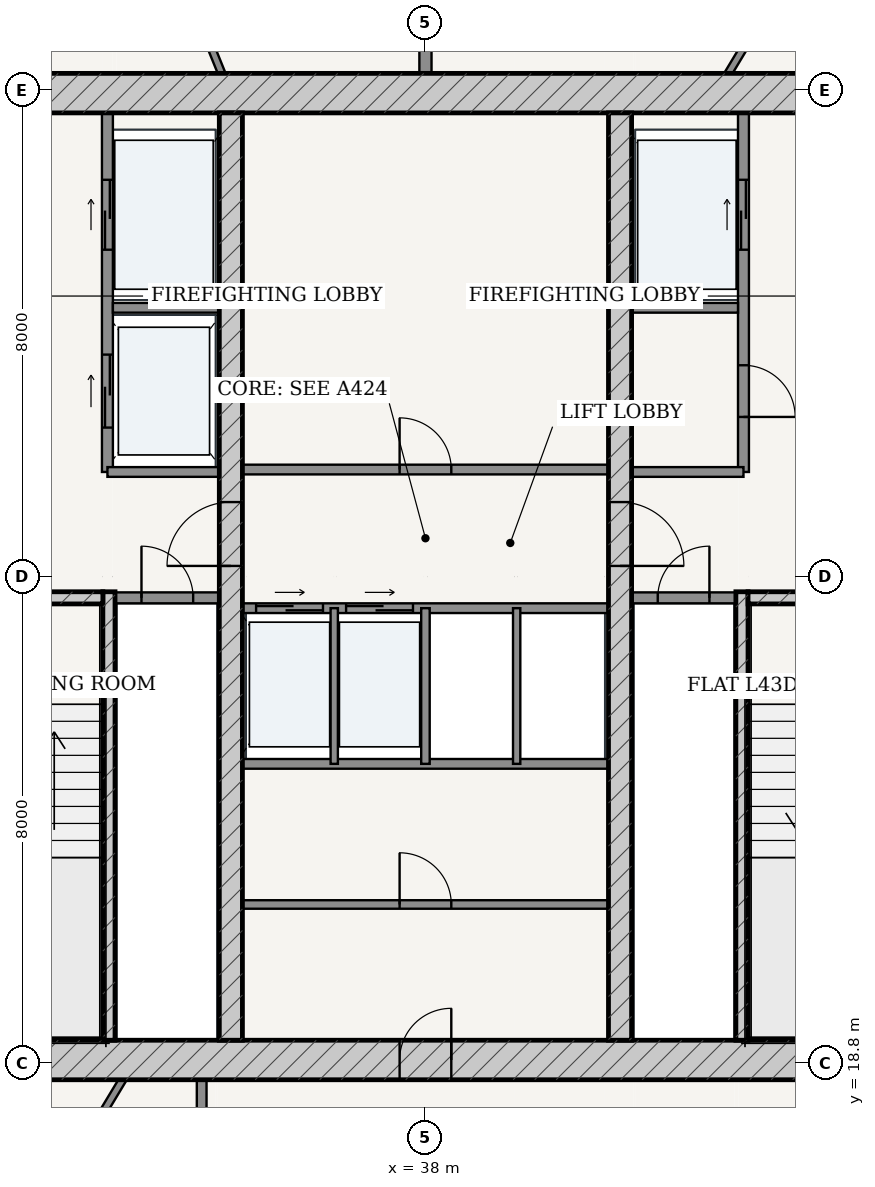
"""IFC4 building model, lengths in metres.
Left out: names, types, materials, properties, quantities, classifications, styles, units other than length and angle.
Written with IfcOpenShell. Run it as: python <this file> out.ifc"""

import sys

from ifc_helpers import new_model, si_unit, direction, frame, frame_2d, origin, place, context, subcontext, project, spatial, rectangle, extrude, source, transform, mapped, element, fill, save


model = new_model("IFC4")
c1 = context("Model", 3, precision=1e-05, world=origin(), true_north=direction((-0.2419218956, 0.970295726276)))
c2 = subcontext(c1, "Body", "Model", "MODEL_VIEW")
j1 = project(units=[si_unit("LENGTHUNIT", "METRE"), si_unit("PLANEANGLEUNIT", "RADIAN")], contexts=[c1])
p1 = place(None, origin())
s1 = spatial("IfcSite", under=j1, at=p1, CompositionType="ELEMENT")
p2 = place(p1, origin())
s2 = spatial("IfcBuilding", under=s1, at=p2, CompositionType="ELEMENT")
p3 = place(p2, frame((0.0, 0.0, 164.2)))
s3 = spatial("IfcBuildingStorey", under=s2, at=p3, CompositionType="ELEMENT", Elevation=164.2)
p4 = place(p3, frame((28.725, 18.85, 0.0), z_axis=(0.0, 0.0, 1.0), x_axis=(1.0, 0.0, 0.0)))
e1 = element("IfcWall", 1, at=p4, inside=s3, PredefinedType="SHEAR", context=c2, shape_type="SweptSolid", body=[
    extrude(rectangle(XDim=18.55, YDim=0.65, at=frame_2d((9.275, 0.0))), origin(), (0.0, 0.0, 1.0), 3.33),
])
p5 = place(p4, frame((8.85, 0.0, 0.0)))
e2 = element("IfcOpeningElement", 2, at=p5, cuts=e1, PredefinedType="OPENING", context=c2, shape_type="SweptSolid", body=[
    extrude(rectangle(XDim=0.85, YDim=2.1, at=frame_2d((0.425, 1.05))), frame((0.0, 0.335, 0.0), z_axis=(0.0, -1.0, 0.0), x_axis=(1.0, 0.0, 0.0)), (0.0, 0.0, 1.0), 0.67),
])
p6 = place(p3, frame((28.725, 34.75, 0.0), z_axis=(0.0, 0.0, 1.0), x_axis=(1.0, 0.0, 0.0)))
e3 = element("IfcWall", 3, at=p6, inside=s3, PredefinedType="SHEAR", context=c2, shape_type="SweptSolid", body=[
    extrude(rectangle(XDim=18.55, YDim=0.65, at=frame_2d((9.275, 0.0))), origin(), (0.0, 0.0, 1.0), 3.33),
])
p7 = place(p3, frame((32.795, 19.175, 0.0), z_axis=(0.0, 0.0, 1.0), x_axis=(0.0, 1.0, 0.0)))
e4 = element("IfcWall", 4, at=p7, inside=s3, PredefinedType="SOLIDWALL", context=c2, shape_type="SweptSolid", body=[
    extrude(rectangle(XDim=7.375, YDim=0.2, at=frame_2d((3.688, 0.0))), origin(), (0.0, 0.0, 1.0), 3.33),
])
p8 = place(p3, frame((29.375, 26.45, 0.0), z_axis=(0.0, 0.0, 1.0), x_axis=(1.0, 0.0, 0.0)))
e5 = element("IfcWall", 5, at=p8, inside=s3, PredefinedType="SOLIDWALL", context=c2, shape_type="SweptSolid", body=[
    extrude(rectangle(XDim=3.32, YDim=0.2, at=frame_2d((1.66, 0.0))), origin(), (0.0, 0.0, 1.0), 3.33),
])
p9 = place(p8, frame((1.185, 0.0, 0.0)))
e6 = element("IfcOpeningElement", 6, at=p9, cuts=e5, PredefinedType="OPENING", context=c2, shape_type="SweptSolid", body=[
    extrude(rectangle(XDim=0.95, YDim=2.15, at=frame_2d((0.475, 1.075))), frame((0.0, 0.11, 0.0), z_axis=(0.0, -1.0, 0.0), x_axis=(1.0, 0.0, 0.0)), (0.0, 0.0, 1.0), 0.22),
])
p10 = place(p3, frame((43.205, 19.175, 0.0), z_axis=(0.0, 0.0, 1.0), x_axis=(0.0, 1.0, 0.0)))
e7 = element("IfcWall", 7, at=p10, inside=s3, PredefinedType="SOLIDWALL", context=c2, shape_type="SweptSolid", body=[
    extrude(rectangle(XDim=7.375, YDim=0.2, at=frame_2d((3.688, 0.0))), origin(), (0.0, 0.0, 1.0), 3.33),
])
p11 = place(p3, frame((43.305, 26.45, 0.0), z_axis=(0.0, 0.0, 1.0), x_axis=(1.0, 0.0, 0.0)))
e8 = element("IfcWall", 8, at=p11, inside=s3, PredefinedType="SOLIDWALL", context=c2, shape_type="SweptSolid", body=[
    extrude(rectangle(XDim=3.32, YDim=0.2, at=frame_2d((1.66, 0.0))), origin(), (0.0, 0.0, 1.0), 3.33),
])
p12 = place(p11, frame((1.185, 0.0, 0.0)))
e9 = element("IfcOpeningElement", 9, at=p12, cuts=e8, PredefinedType="OPENING", context=c2, shape_type="SweptSolid", body=[
    extrude(rectangle(XDim=0.95, YDim=2.15, at=frame_2d((0.475, 1.075))), frame((0.0, 0.11, 0.0), z_axis=(0.0, -1.0, 0.0), x_axis=(1.0, 0.0, 0.0)), (0.0, 0.0, 1.0), 0.22),
])
p13 = place(p3, frame((34.8, 19.175, 0.0), z_axis=(0.0, 0.0, 1.0), x_axis=(0.0, 1.0, 0.0)))
e10 = element("IfcWall", 10, at=p13, inside=s3, PredefinedType="SHEAR", context=c2, shape_type="SweptSolid", body=[
    extrude(rectangle(XDim=15.25, YDim=0.38, at=frame_2d((7.625, 0.0))), origin(), (0.0, 0.0, 1.0), 3.33),
])
p14 = place(p13, frame((7.8, 0.0, 0.0)))
e11 = element("IfcOpeningElement", 11, at=p14, cuts=e10, PredefinedType="OPENING", context=c2, shape_type="SweptSolid", body=[
    extrude(rectangle(XDim=1.05, YDim=2.15, at=frame_2d((0.525, 1.075))), frame((0.0, 0.2, 0.0), z_axis=(0.0, -1.0, 0.0), x_axis=(1.0, 0.0, 0.0)), (0.0, 0.0, 1.0), 0.4),
])
p15 = place(p3, frame((41.2, 19.175, 0.0), z_axis=(0.0, 0.0, 1.0), x_axis=(0.0, 1.0, 0.0)))
e12 = element("IfcWall", 12, at=p15, inside=s3, PredefinedType="SHEAR", context=c2, shape_type="SweptSolid", body=[
    extrude(rectangle(XDim=15.25, YDim=0.38, at=frame_2d((7.625, 0.0))), origin(), (0.0, 0.0, 1.0), 3.33),
])
p16 = place(p15, frame((7.8, 0.0, 0.0)))
e13 = element("IfcOpeningElement", 13, at=p16, cuts=e12, PredefinedType="OPENING", context=c2, shape_type="SweptSolid", body=[
    extrude(rectangle(XDim=1.05, YDim=2.15, at=frame_2d((0.525, 1.075))), frame((0.0, 0.2, 0.0), z_axis=(0.0, -1.0, 0.0), x_axis=(1.0, 0.0, 0.0)), (0.0, 0.0, 1.0), 0.4),
])
p17 = place(p3, frame((32.9, 26.45, 0.0), z_axis=(0.0, 0.0, 1.0), x_axis=(1.0, 0.0, 0.0)))
e14 = element("IfcWall", 14, at=p17, inside=s3, PredefinedType="PARTITIONING", context=c2, shape_type="SweptSolid", body=[
    extrude(rectangle(XDim=1.71, YDim=0.18, at=frame_2d((0.855, 0.0))), origin(), (0.0, 0.0, 1.0), 3.33),
])
p18 = place(p17, frame((0.43, 0.0, 0.0)))
e15 = element("IfcOpeningElement", 15, at=p18, cuts=e14, PredefinedType="OPENING", context=c2, shape_type="SweptSolid", body=[
    extrude(rectangle(XDim=0.85, YDim=2.1, at=frame_2d((0.425, 1.05))), frame((0.0, 0.1, 0.0), z_axis=(0.0, -1.0, 0.0), x_axis=(1.0, 0.0, 0.0)), (0.0, 0.0, 1.0), 0.2),
])
p19 = place(p3, frame((41.39, 26.45, 0.0), z_axis=(0.0, 0.0, 1.0), x_axis=(1.0, 0.0, 0.0)))
e16 = element("IfcWall", 16, at=p19, inside=s3, PredefinedType="PARTITIONING", context=c2, shape_type="SweptSolid", body=[
    extrude(rectangle(XDim=1.71, YDim=0.18, at=frame_2d((0.855, 0.0))), origin(), (0.0, 0.0, 1.0), 3.33),
])
p20 = place(p19, frame((0.43, 0.0, 0.0)))
e17 = element("IfcOpeningElement", 17, at=p20, cuts=e16, PredefinedType="OPENING", context=c2, shape_type="SweptSolid", body=[
    extrude(rectangle(XDim=0.85, YDim=2.1, at=frame_2d((0.425, 1.05))), frame((0.0, 0.1, 0.0), z_axis=(0.0, -1.0, 0.0), x_axis=(1.0, 0.0, 0.0)), (0.0, 0.0, 1.0), 0.2),
])
p21 = place(p3, frame((32.77, 28.52, 0.0), z_axis=(0.0, 0.0, 1.0), x_axis=(0.0, 1.0, 0.0)))
e18 = element("IfcWall", 18, at=p21, inside=s3, PredefinedType="PARTITIONING", context=c2, shape_type="SweptSolid", body=[
    extrude(rectangle(XDim=5.905, YDim=0.18, at=frame_2d((2.953, 0.0))), origin(), (0.0, 0.0, 1.0), 3.33),
])
p22 = place(p21, frame((3.655, 0.0, 0.0)))
e19 = element("IfcOpeningElement", 19, at=p22, cuts=e18, PredefinedType="OPENING", context=c2, shape_type="SweptSolid", body=[
    extrude(rectangle(XDim=1.15, YDim=2.2, at=frame_2d((0.575, 1.1))), frame((0.0, 0.1, 0.0), z_axis=(0.0, -1.0, 0.0), x_axis=(1.0, 0.0, 0.0)), (0.0, 0.0, 1.0), 0.2),
])
p23 = place(p21, frame((0.73, 0.0, 0.0)))
e20 = element("IfcOpeningElement", 20, at=p23, cuts=e18, PredefinedType="OPENING", context=c2, shape_type="SweptSolid", body=[
    extrude(rectangle(XDim=1.2, YDim=2.25, at=frame_2d((0.6, 1.125))), frame((0.0, 0.1, 0.0), z_axis=(0.0, -1.0, 0.0), x_axis=(1.0, 0.0, 0.0)), (0.0, 0.0, 1.0), 0.2),
])
p24 = place(p3, frame((32.86, 31.22, 0.0), z_axis=(0.0, 0.0, 1.0), x_axis=(1.0, 0.0, 0.0)))
e21 = element("IfcWall", 21, at=p24, inside=s3, PredefinedType="PARTITIONING", context=c2, shape_type="SweptSolid", body=[
    extrude(rectangle(XDim=1.75, YDim=0.16, at=frame_2d((0.875, 0.0))), origin(), (0.0, 0.0, 1.0), 3.33),
])
p25 = place(p3, frame((32.77, 28.52, 0.0), z_axis=(0.0, 0.0, 1.0), x_axis=(1.0, 0.0, 0.0)))
e22 = element("IfcWall", 22, at=p25, inside=s3, PredefinedType="PARTITIONING", context=c2, shape_type="SweptSolid", body=[
    extrude(rectangle(XDim=1.84, YDim=0.16, at=frame_2d((0.92, 0.0))), origin(), (0.0, 0.0, 1.0), 3.33),
])
p26 = place(p3, frame((43.23, 28.52, 0.0), z_axis=(0.0, 0.0, 1.0), x_axis=(0.0, 1.0, 0.0)))
e23 = element("IfcWall", 23, at=p26, inside=s3, PredefinedType="PARTITIONING", context=c2, shape_type="SweptSolid", body=[
    extrude(rectangle(XDim=5.905, YDim=0.18, at=frame_2d((2.953, 0.0))), origin(), (0.0, 0.0, 1.0), 3.33),
])
p27 = place(p26, frame((0.905, 0.0, 0.0)))
e24 = element("IfcOpeningElement", 24, at=p27, cuts=e23, PredefinedType="OPENING", context=c2, shape_type="SweptSolid", body=[
    extrude(rectangle(XDim=0.85, YDim=2.1, at=frame_2d((0.425, 1.05))), frame((0.0, 0.1, 0.0), z_axis=(0.0, -1.0, 0.0), x_axis=(1.0, 0.0, 0.0)), (0.0, 0.0, 1.0), 0.2),
])
p28 = place(p26, frame((3.655, 0.0, 0.0)))
e25 = element("IfcOpeningElement", 25, at=p28, cuts=e23, PredefinedType="OPENING", context=c2, shape_type="SweptSolid", body=[
    extrude(rectangle(XDim=1.15, YDim=2.2, at=frame_2d((0.575, 1.1))), frame((0.0, 0.1, 0.0), z_axis=(0.0, -1.0, 0.0), x_axis=(1.0, 0.0, 0.0)), (0.0, 0.0, 1.0), 0.2),
])
p29 = place(p3, frame((41.39, 31.22, 0.0), z_axis=(0.0, 0.0, 1.0), x_axis=(1.0, 0.0, 0.0)))
e26 = element("IfcWall", 26, at=p29, inside=s3, PredefinedType="PARTITIONING", context=c2, shape_type="SweptSolid", body=[
    extrude(rectangle(XDim=1.75, YDim=0.16, at=frame_2d((0.875, 0.0))), origin(), (0.0, 0.0, 1.0), 3.33),
])
p30 = place(p3, frame((41.39, 28.52, 0.0), z_axis=(0.0, 0.0, 1.0), x_axis=(1.0, 0.0, 0.0)))
e27 = element("IfcWall", 27, at=p30, inside=s3, PredefinedType="PARTITIONING", context=c2, shape_type="SweptSolid", body=[
    extrude(rectangle(XDim=1.84, YDim=0.16, at=frame_2d((0.92, 0.0))), origin(), (0.0, 0.0, 1.0), 3.33),
])
p31 = place(p3, frame((34.99, 28.56, 0.0), z_axis=(0.0, 0.0, 1.0), x_axis=(1.0, 0.0, 0.0)))
e28 = element("IfcWall", 28, at=p31, inside=s3, PredefinedType="PARTITIONING", context=c2, shape_type="SweptSolid", body=[
    extrude(rectangle(XDim=6.02, YDim=0.16, at=frame_2d((3.01, 0.0))), origin(), (0.0, 0.0, 1.0), 3.33),
])
p32 = place(p31, frame((2.585, 0.0, 0.0)))
e29 = element("IfcOpeningElement", 29, at=p32, cuts=e28, PredefinedType="OPENING", context=c2, shape_type="SweptSolid", body=[
    extrude(rectangle(XDim=0.85, YDim=2.1, at=frame_2d((0.425, 1.05))), frame((0.0, 0.09, 0.0), z_axis=(0.0, -1.0, 0.0), x_axis=(1.0, 0.0, 0.0)), (0.0, 0.0, 1.0), 0.18),
])
p33 = place(p3, frame((34.99, 26.28, 0.0), z_axis=(0.0, 0.0, 1.0), x_axis=(1.0, 0.0, 0.0)))
e30 = element("IfcWall", 30, at=p33, inside=s3, PredefinedType="PARTITIONING", context=c2, shape_type="SweptSolid", body=[
    extrude(rectangle(XDim=6.02, YDim=0.16, at=frame_2d((3.01, 0.0))), origin(), (0.0, 0.0, 1.0), 3.33),
])
p34 = place(p33, frame((0.225, 0.0, 0.0)))
e31 = element("IfcOpeningElement", 31, at=p34, cuts=e30, PredefinedType="OPENING", context=c2, shape_type="SweptSolid", body=[
    extrude(rectangle(XDim=1.1, YDim=2.2, at=frame_2d((0.55, 1.1))), frame((0.0, 0.09, 0.0), z_axis=(0.0, -1.0, 0.0), x_axis=(1.0, 0.0, 0.0)), (0.0, 0.0, 1.0), 0.18),
])
p35 = place(p33, frame((1.705, 0.0, 0.0)))
e32 = element("IfcOpeningElement", 32, at=p35, cuts=e30, PredefinedType="OPENING", context=c2, shape_type="SweptSolid", body=[
    extrude(rectangle(XDim=1.1, YDim=2.2, at=frame_2d((0.55, 1.1))), frame((0.0, 0.09, 0.0), z_axis=(0.0, -1.0, 0.0), x_axis=(1.0, 0.0, 0.0)), (0.0, 0.0, 1.0), 0.18),
])
p36 = place(p3, frame((34.99, 23.72, 0.0), z_axis=(0.0, 0.0, 1.0), x_axis=(1.0, 0.0, 0.0)))
e33 = element("IfcWall", 33, at=p36, inside=s3, PredefinedType="PARTITIONING", context=c2, shape_type="SweptSolid", body=[
    extrude(rectangle(XDim=6.02, YDim=0.16, at=frame_2d((3.01, 0.0))), origin(), (0.0, 0.0, 1.0), 3.33),
])
p37 = place(p3, frame((36.5, 23.72, 0.0), z_axis=(0.0, 0.0, 1.0), x_axis=(0.0, 1.0, 0.0)))
e34 = element("IfcWall", 34, at=p37, inside=s3, PredefinedType="PARTITIONING", context=c2, shape_type="SweptSolid", body=[
    extrude(rectangle(XDim=2.56, YDim=0.12, at=frame_2d((1.28, 0.0))), origin(), (0.0, 0.0, 1.0), 3.33),
])
p38 = place(p3, frame((38.0, 23.72, 0.0), z_axis=(0.0, 0.0, 1.0), x_axis=(0.0, 1.0, 0.0)))
e35 = element("IfcWall", 35, at=p38, inside=s3, PredefinedType="PARTITIONING", context=c2, shape_type="SweptSolid", body=[
    extrude(rectangle(XDim=2.56, YDim=0.14, at=frame_2d((1.28, 0.0))), origin(), (0.0, 0.0, 1.0), 3.33),
])
p39 = place(p3, frame((39.5, 23.72, 0.0), z_axis=(0.0, 0.0, 1.0), x_axis=(0.0, 1.0, 0.0)))
e36 = element("IfcWall", 36, at=p39, inside=s3, PredefinedType="PARTITIONING", context=c2, shape_type="SweptSolid", body=[
    extrude(rectangle(XDim=2.56, YDim=0.12, at=frame_2d((1.28, 0.0))), origin(), (0.0, 0.0, 1.0), 3.33),
])
p40 = place(p3, frame((34.99, 21.407, 0.0), z_axis=(0.0, 0.0, 1.0), x_axis=(1.0, 0.0, 0.0)))
e37 = element("IfcWall", 37, at=p40, inside=s3, PredefinedType="PARTITIONING", context=c2, shape_type="SweptSolid", body=[
    extrude(rectangle(XDim=6.02, YDim=0.14, at=frame_2d((3.01, 0.0))), origin(), (0.0, 0.0, 1.0), 3.33),
])
p41 = place(p40, frame((2.585, 0.0, 0.0)))
e38 = element("IfcOpeningElement", 38, at=p41, cuts=e37, PredefinedType="OPENING", context=c2, shape_type="SweptSolid", body=[
    extrude(rectangle(XDim=0.85, YDim=2.1, at=frame_2d((0.425, 1.05))), frame((0.0, 0.08, 0.0), z_axis=(0.0, -1.0, 0.0), x_axis=(1.0, 0.0, 0.0)), (0.0, 0.0, 1.0), 0.16),
])
p42 = place(p3, frame((34.32, 16.675, 0.0), z_axis=(0.0, 0.0, 1.0), x_axis=(0.0, 1.0, 0.0)))
e39 = element("IfcWall", 39, at=p42, inside=s3, PredefinedType="PARTITIONING", context=c2, shape_type="SweptSolid", body=[
    extrude(rectangle(XDim=1.85, YDim=0.16, at=frame_2d((0.925, 0.0))), origin(), (0.0, 0.0, 1.0), 3.33),
])
p43 = place(p3, frame((42.98, 35.075, 0.0), z_axis=(0.0, 0.0, 1.0), x_axis=(0.515686235332, 0.856777512946, 0.0)))
e40 = element("IfcWall", 40, at=p43, inside=s3, PredefinedType="PARTITIONING", context=c2, shape_type="SweptSolid", body=[
    extrude(rectangle(XDim=3.346, YDim=0.12, at=frame_2d((1.673, 0.0))), origin(), (0.0, 0.0, 1.0), 3.33),
])
p44 = place(p3, frame((38.0, 35.075, 0.0), z_axis=(0.0, 0.0, 1.0), x_axis=(0.0, 1.0, 0.0)))
e41 = element("IfcWall", 41, at=p44, inside=s3, PredefinedType="PARTITIONING", context=c2, shape_type="SweptSolid", body=[
    extrude(rectangle(XDim=12.465, YDim=0.2, at=frame_2d((6.232, 0.0))), origin(), (0.0, 0.0, 1.0), 2.415),
])
p45 = place(p3, frame((34.649, 35.075, 0.0), z_axis=(0.0, 0.0, 1.0), x_axis=(-0.37535719187, 0.926880239573, 0.0)))
e42 = element("IfcWall", 42, at=p45, inside=s3, PredefinedType="PARTITIONING", context=c2, shape_type="SweptSolid", body=[
    extrude(rectangle(XDim=2.916, YDim=0.12, at=frame_2d((1.458, 0.0))), origin(), (0.0, 0.0, 1.0), 3.33),
])
p46 = place(p45, frame((1.028, 0.0, 0.0)))
e43 = element("IfcOpeningElement", 43, at=p46, cuts=e42, PredefinedType="OPENING", context=c2, shape_type="SweptSolid", body=[
    extrude(rectangle(XDim=0.86, YDim=2.15, at=frame_2d((0.43, 1.075))), frame((0.0, 0.07, 0.0), z_axis=(0.0, -1.0, 0.0), x_axis=(1.0, 0.0, 0.0)), (0.0, 0.0, 1.0), 0.14),
])
p47 = place(p3, frame((33.02, 18.525, 0.0), z_axis=(0.0, 0.0, 1.0), x_axis=(-0.515677168, -0.856782970421, 0.0)))
e44 = element("IfcWall", 44, at=p47, inside=s3, PredefinedType="PARTITIONING", context=c2, shape_type="SweptSolid", body=[
    extrude(rectangle(XDim=3.159, YDim=0.12, at=frame_2d((1.58, 0.0))), origin(), (0.0, 0.0, 1.0), 3.33),
])
p48 = place(p47, frame((1.15, 0.0, 0.0)))
e45 = element("IfcOpeningElement", 45, at=p48, cuts=e44, PredefinedType="OPENING", context=c2, shape_type="SweptSolid", body=[
    extrude(rectangle(XDim=0.86, YDim=2.15, at=frame_2d((0.43, 1.075))), frame((0.0, 0.07, 0.0), z_axis=(0.0, -1.0, 0.0), x_axis=(1.0, 0.0, 0.0)), (0.0, 0.0, 1.0), 0.14),
])
m1 = source(origin(), c2, "Body", "SweptSolid", [
    extrude(rectangle(XDim=1.05, YDim=2.15, at=frame_2d((0.525, 1.075))), frame((0.0, 0.025, 0.0), z_axis=(0.0, -1.0, 0.0), x_axis=(1.0, 0.0, 0.0)), (0.0, 0.0, 1.0), 0.05),
])
p49 = place(p14, origin())
e46 = element("IfcDoor", 46, at=p49, inside=s3, OperationType="SINGLE_SWING_LEFT", PredefinedType="DOOR", context=c2, shape_type="MappedRepresentation", body=[
    mapped(m1, transform((0.0, 0.0, 0.0), scale=1.0)),
])
fill(e11, e46)
p50 = place(p16, frame((1.05, 0.0, 0.0), z_axis=(0.0, 0.0, 1.0), x_axis=(-1.0, 0.0, 0.0)))
e47 = element("IfcDoor", 47, at=p50, inside=s3, OperationType="SINGLE_SWING_RIGHT", PredefinedType="DOOR", context=c2, shape_type="MappedRepresentation", body=[
    mapped(m1, transform((0.0, 0.0, 0.0), scale=1.0)),
])
fill(e13, e47)
m2 = source(origin(), c2, "Body", "SweptSolid", [
    extrude(rectangle(XDim=0.85, YDim=2.1, at=frame_2d((0.425, 1.05))), frame((0.0, 0.025, 0.0), z_axis=(0.0, -1.0, 0.0), x_axis=(1.0, 0.0, 0.0)), (0.0, 0.0, 1.0), 0.05),
])
p51 = place(p18, origin())
e48 = element("IfcDoor", 48, at=p51, inside=s3, OperationType="SINGLE_SWING_LEFT", PredefinedType="DOOR", context=c2, shape_type="MappedRepresentation", body=[
    mapped(m2, transform((0.0, 0.0, 0.0), scale=1.0)),
])
fill(e15, e48)
p52 = place(p20, origin())
e49 = element("IfcDoor", 49, at=p52, inside=s3, OperationType="SINGLE_SWING_RIGHT", PredefinedType="DOOR", context=c2, shape_type="MappedRepresentation", body=[
    mapped(m2, transform((0.0, 0.0, 0.0), scale=1.0)),
])
fill(e17, e49)
p53 = place(p27, frame((0.85, 0.0, 0.0), z_axis=(0.0, 0.0, 1.0), x_axis=(-1.0, 0.0, 0.0)))
e50 = element("IfcDoor", 50, at=p53, inside=s3, OperationType="SINGLE_SWING_RIGHT", PredefinedType="DOOR", context=c2, shape_type="MappedRepresentation", body=[
    mapped(m2, transform((0.0, 0.0, 0.0), scale=1.0)),
])
fill(e24, e50)
p54 = place(p32, origin())
e51 = element("IfcDoor", 51, at=p54, inside=s3, OperationType="SINGLE_SWING_LEFT", PredefinedType="DOOR", context=c2, shape_type="MappedRepresentation", body=[
    mapped(m2, transform((0.0, 0.0, 0.0), scale=1.0)),
])
fill(e29, e51)
p55 = place(p5, origin())
e52 = element("IfcDoor", 52, at=p55, inside=s3, OperationType="SINGLE_SWING_RIGHT", PredefinedType="DOOR", context=c2, shape_type="MappedRepresentation", body=[
    mapped(m2, transform((0.0, 0.0, 0.0), scale=1.0)),
])
fill(e2, e52)
p56 = place(p41, origin())
e53 = element("IfcDoor", 53, at=p56, inside=s3, OperationType="SINGLE_SWING_LEFT", PredefinedType="DOOR", context=c2, shape_type="MappedRepresentation", body=[
    mapped(m2, transform((0.0, 0.0, 0.0), scale=1.0)),
])
fill(e38, e53)
m3 = source(origin(), c2, "Body", "SweptSolid", [
    extrude(rectangle(XDim=1.15, YDim=2.2, at=frame_2d((0.575, 1.1))), frame((0.0, 0.025, 0.0), z_axis=(0.0, -1.0, 0.0), x_axis=(1.0, 0.0, 0.0)), (0.0, 0.0, 1.0), 0.05),
])
p57 = place(p22, origin())
e54 = element("IfcDoor", 54, at=p57, inside=s3, OperationType="DOUBLE_DOOR_SLIDING", PredefinedType="DOOR", context=c2, shape_type="MappedRepresentation", body=[
    mapped(m3, transform((0.0, 0.0, 0.0), scale=1.0)),
])
fill(e19, e54)
p58 = place(p28, origin())
e55 = element("IfcDoor", 55, at=p58, inside=s3, OperationType="DOUBLE_DOOR_SLIDING", PredefinedType="DOOR", context=c2, shape_type="MappedRepresentation", body=[
    mapped(m3, transform((0.0, 0.0, 0.0), scale=1.0)),
])
fill(e25, e55)
m4 = source(origin(), c2, "Body", "SweptSolid", [
    extrude(rectangle(XDim=1.2, YDim=2.25, at=frame_2d((0.6, 1.125))), frame((0.0, 0.025, 0.0), z_axis=(0.0, -1.0, 0.0), x_axis=(1.0, 0.0, 0.0)), (0.0, 0.0, 1.0), 0.05),
])
p59 = place(p23, origin())
e56 = element("IfcDoor", 56, at=p59, inside=s3, OperationType="DOUBLE_DOOR_SLIDING", PredefinedType="DOOR", context=c2, shape_type="MappedRepresentation", body=[
    mapped(m4, transform((0.0, 0.0, 0.0), scale=1.0)),
])
fill(e20, e56)
m5 = source(origin(), c2, "Body", "SweptSolid", [
    extrude(rectangle(XDim=1.1, YDim=2.2, at=frame_2d((0.55, 1.1))), frame((0.0, 0.025, 0.0), z_axis=(0.0, -1.0, 0.0), x_axis=(1.0, 0.0, 0.0)), (0.0, 0.0, 1.0), 0.05),
])
p60 = place(p34, origin())
e57 = element("IfcDoor", 57, at=p60, inside=s3, OperationType="DOUBLE_DOOR_SLIDING", PredefinedType="DOOR", context=c2, shape_type="MappedRepresentation", body=[
    mapped(m5, transform((0.0, 0.0, 0.0), scale=1.0)),
])
fill(e31, e57)
p61 = place(p35, origin())
e58 = element("IfcDoor", 58, at=p61, inside=s3, OperationType="DOUBLE_DOOR_SLIDING", PredefinedType="DOOR", context=c2, shape_type="MappedRepresentation", body=[
    mapped(m5, transform((0.0, 0.0, 0.0), scale=1.0)),
])
fill(e32, e58)
save(model, sys.argv[1])
